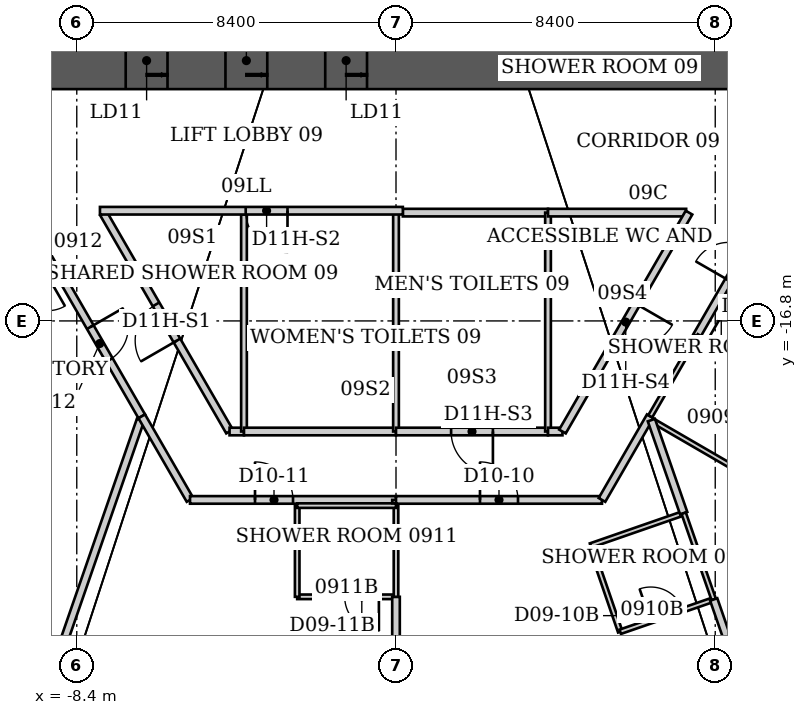
"""IFC4 building model, lengths in metres.
Left out: names, types, materials, properties, quantities, classifications, styles, units other than length and angle.
Written with IfcOpenShell. Run it as: python <this file> out.ifc"""

import sys

from ifc_helpers import new_model, si_unit, direction, frame, frame_2d, origin, place, context, subcontext, project, spatial, rectangle, extrude, element, fill, save


model = new_model("IFC4")
c1 = context("Model", 3, precision=1e-05, world=origin(), true_north=direction((0.0, 1.0)))
c2 = subcontext(c1, "Body", "Model", "MODEL_VIEW")
j1 = project(units=[si_unit("LENGTHUNIT", "METRE"), si_unit("PLANEANGLEUNIT", "RADIAN")], contexts=[c1])
p1 = place(None, origin())
s1 = spatial("IfcSite", under=j1, at=p1, CompositionType="ELEMENT")
p2 = place(p1, origin())
s2 = spatial("IfcBuilding", under=s1, at=p2, CompositionType="ELEMENT")
p3 = place(p2, frame((0.0, 0.0, 42.0)))
s3 = spatial("IfcBuildingStorey", under=s2, at=p3, CompositionType="ELEMENT", Elevation=42.0)
p4 = place(p3, frame((-9.25, -9.95, 0.0), z_axis=(0.0, 0.0, 1.0), x_axis=(1.0, 0.0, 0.0)))
e1 = element("IfcWall", 1, at=p4, inside=s3, PredefinedType="SHEAR", context=c2, shape_type="SweptSolid", body=[
    extrude(rectangle(XDim=18.5, YDim=1.5, at=frame_2d((9.25, 0.0))), origin(), (0.0, 0.0, 1.0), 3.8),
])
p5 = place(p4, frame((2.137, 0.0, 0.0)))
e2 = element("IfcOpeningElement", 2, at=p5, cuts=e1, PredefinedType="OPENING", context=c2, shape_type="SweptSolid", body=[
    extrude(rectangle(XDim=1.1, YDim=2.1, at=frame_2d((0.55, 1.05))), frame((0.0, 0.75, 0.0), z_axis=(0.0, -1.0, 0.0), x_axis=(1.0, 0.0, 0.0)), (0.0, 0.0, 1.0), 1.5),
])
p6 = place(p4, frame((4.762, 0.0, 0.0)))
e3 = element("IfcOpeningElement", 3, at=p6, cuts=e1, PredefinedType="OPENING", context=c2, shape_type="SweptSolid", body=[
    extrude(rectangle(XDim=1.1, YDim=2.1, at=frame_2d((0.55, 1.05))), frame((0.0, 0.75, 0.0), z_axis=(0.0, -1.0, 0.0), x_axis=(1.0, 0.0, 0.0)), (0.0, 0.0, 1.0), 1.5),
])
p7 = place(p4, frame((7.387, 0.0, 0.0)))
e4 = element("IfcOpeningElement", 4, at=p7, cuts=e1, PredefinedType="OPENING", context=c2, shape_type="SweptSolid", body=[
    extrude(rectangle(XDim=1.1, YDim=2.1, at=frame_2d((0.55, 1.05))), frame((0.0, 0.75, 0.0), z_axis=(0.0, -1.0, 0.0), x_axis=(1.0, 0.0, 0.0)), (0.0, 0.0, 1.0), 1.5),
])
p8 = place(p3, frame((-11.17, -16.79, 0.0), z_axis=(0.0, 0.0, 1.0), x_axis=(0.866114241029, 0.499846097802, 0.0)))
e5 = element("IfcWall", 5, at=p8, inside=s3, PredefinedType="PARTITIONING", context=c2, shape_type="SweptSolid", body=[
    extrude(rectangle(XDim=2.621, YDim=0.12, at=frame_2d((1.311, 0.0))), origin(), (0.0, 0.0, 1.0), 3.64),
])
p9 = place(p8, frame((1.421, 0.0, 0.0)))
e6 = element("IfcOpeningElement", 6, at=p9, cuts=e5, PredefinedType="OPENING", context=c2, shape_type="SweptSolid", body=[
    extrude(rectangle(XDim=0.9, YDim=2.03, at=frame_2d((0.45, 1.015))), frame((0.0, 0.06, 0.0), z_axis=(0.0, -1.0, 0.0), x_axis=(1.0, 0.0, 0.0)), (0.0, 0.0, 1.0), 0.12),
])
p10 = place(p3, frame((-10.2, -29.442, 0.0), z_axis=(0.0, 0.0, 1.0), x_axis=(0.327375786306, 0.944894223996, 0.0)))
e7 = element("IfcWall", 7, at=p10, inside=s3, PredefinedType="PARTITIONING", context=c2, shape_type="SweptSolid", body=[
    extrude(rectangle(XDim=10.623, YDim=0.2, at=frame_2d((5.311, 0.0))), origin(), (0.0, 0.0, 1.0), 3.64),
])
p11 = place(p3, frame((-10.1, -13.4, 0.0), z_axis=(0.0, 0.0, 1.0), x_axis=(0.499769390944, -0.866158505053, 0.0)))
e8 = element("IfcWall", 8, at=p11, inside=s3, PredefinedType="PARTITIONING", context=c2, shape_type="SweptSolid", body=[
    extrude(rectangle(XDim=2.402, YDim=0.12, at=frame_2d((1.201, 0.0))), origin(), (0.0, 0.0, 1.0), 3.64),
])
p12 = place(p3, frame((-8.9, -15.48, 0.0), z_axis=(0.0, 0.0, 1.0), x_axis=(0.499773435832, -0.866156171159, 0.0)))
e9 = element("IfcWall", 9, at=p12, inside=s3, PredefinedType="PARTITIONING", context=c2, shape_type="SweptSolid", body=[
    extrude(rectangle(XDim=4.422, YDim=0.2, at=frame_2d((2.211, 0.0))), origin(), (0.0, 0.0, 1.0), 3.64),
])
p13 = place(p12, frame((1.711, 0.0, 0.0)))
e10 = element("IfcOpeningElement", 10, at=p13, cuts=e9, PredefinedType="OPENING", context=c2, shape_type="SweptSolid", body=[
    extrude(rectangle(XDim=1.0, YDim=2.13, at=frame_2d((0.5, 1.065))), frame((0.0, 0.1, 0.0), z_axis=(0.0, -1.0, 0.0), x_axis=(1.0, 0.0, 0.0)), (0.0, 0.0, 1.0), 0.2),
])
p14 = place(p3, frame((-6.69, -19.31, 0.0), z_axis=(0.0, 0.0, 1.0), x_axis=(0.499963722229, -0.866046347752, 0.0)))
e11 = element("IfcWall", 11, at=p14, inside=s3, PredefinedType="PARTITIONING", context=c2, shape_type="SweptSolid", body=[
    extrude(rectangle(XDim=2.54, YDim=0.2, at=frame_2d((1.27, 0.0))), origin(), (0.0, 0.0, 1.0), 3.64),
])
p15 = place(p3, frame((-5.42, -21.51, 0.0), z_axis=(0.0, 0.0, 1.0), x_axis=(1.0, 0.0, 0.0)))
e12 = element("IfcWall", 12, at=p15, inside=s3, PredefinedType="PARTITIONING", context=c2, shape_type="SweptSolid", body=[
    extrude(rectangle(XDim=5.42, YDim=0.2, at=frame_2d((2.71, 0.0))), origin(), (0.0, 0.0, 1.0), 3.64),
])
p16 = place(p15, frame((1.71, 0.0, 0.0)))
e13 = element("IfcOpeningElement", 13, at=p16, cuts=e12, PredefinedType="OPENING", context=c2, shape_type="SweptSolid", body=[
    extrude(rectangle(XDim=1.0, YDim=2.13, at=frame_2d((0.5, 1.065))), frame((0.0, 0.1, 0.0), z_axis=(0.0, -1.0, 0.0), x_axis=(1.0, 0.0, 0.0)), (0.0, 0.0, 1.0), 0.2),
])
p17 = place(p3, frame((-4.38, -19.71, 0.0), z_axis=(0.0, 0.0, 1.0), x_axis=(-0.500523653757, 0.865722860984, 0.0)))
e14 = element("IfcWall", 14, at=p17, inside=s3, PredefinedType="PARTITIONING", context=c2, shape_type="SweptSolid", body=[
    extrude(rectangle(XDim=6.628, YDim=0.2, at=frame_2d((3.314, 0.0))), origin(), (0.0, 0.0, 1.0), 3.64),
])
p18 = place(p17, frame((2.764, 0.0, 0.0)))
e15 = element("IfcOpeningElement", 15, at=p18, cuts=e14, PredefinedType="OPENING", context=c2, shape_type="SweptSolid", body=[
    extrude(rectangle(XDim=1.1, YDim=2.2, at=frame_2d((0.55, 1.1))), frame((0.0, 0.1, 0.0), z_axis=(0.0, -1.0, 0.0), x_axis=(1.0, 0.0, 0.0)), (0.0, 0.0, 1.0), 0.2),
])
p19 = place(p3, frame((-4.0, -19.71, 0.0), z_axis=(0.0, 0.0, 1.0), x_axis=(-1.0, 0.0, 0.0)))
e16 = element("IfcWall", 16, at=p19, inside=s3, PredefinedType="PARTITIONING", context=c2, shape_type="SweptSolid", body=[
    extrude(rectangle(XDim=0.38, YDim=0.2, at=frame_2d((0.19, 0.0))), origin(), (0.0, 0.0, 1.0), 3.64),
])
p20 = place(p3, frame((-4.0, -14.0, 0.0), z_axis=(0.0, 0.0, 1.0), x_axis=(0.0, -1.0, 0.0)))
e17 = element("IfcWall", 17, at=p20, inside=s3, PredefinedType="PARTITIONING", context=c2, shape_type="SweptSolid", body=[
    extrude(rectangle(XDim=5.71, YDim=0.15, at=frame_2d((2.855, 0.0))), origin(), (0.0, 0.0, 1.0), 3.64),
])
p21 = place(p3, frame((-2.6, -24.06, 0.0), z_axis=(0.0, 0.0, 1.0), x_axis=(1.0, 0.0, 0.0)))
e18 = element("IfcWall", 18, at=p21, inside=s3, PredefinedType="PARTITIONING", context=c2, shape_type="SweptSolid", body=[
    extrude(rectangle(XDim=2.6, YDim=0.12, at=frame_2d((1.3, 0.0))), origin(), (0.0, 0.0, 1.0), 3.64),
])
p22 = place(p21, frame((1.25, 0.0, 0.0)))
e19 = element("IfcOpeningElement", 19, at=p22, cuts=e18, PredefinedType="OPENING", context=c2, shape_type="SweptSolid", body=[
    extrude(rectangle(XDim=0.9, YDim=2.03, at=frame_2d((0.45, 1.015))), frame((0.0, 0.06, 0.0), z_axis=(0.0, -1.0, 0.0), x_axis=(1.0, 0.0, 0.0)), (0.0, 0.0, 1.0), 0.12),
])
p23 = place(p3, frame((-2.6, -21.66, 0.0), z_axis=(0.0, 0.0, 1.0), x_axis=(0.0, -1.0, 0.0)))
e20 = element("IfcWall", 20, at=p23, inside=s3, PredefinedType="PARTITIONING", context=c2, shape_type="SweptSolid", body=[
    extrude(rectangle(XDim=2.4, YDim=0.12, at=frame_2d((1.2, 0.0))), origin(), (0.0, 0.0, 1.0), 3.64),
])
p24 = place(p3, frame((0.0, -29.89, 0.0), z_axis=(0.0, 0.0, 1.0), x_axis=(0.0, 1.0, 0.0)))
e21 = element("IfcWall", 21, at=p24, inside=s3, PredefinedType="PARTITIONING", context=c2, shape_type="SweptSolid", body=[
    extrude(rectangle(XDim=5.83, YDim=0.2, at=frame_2d((2.915, 0.0))), origin(), (0.0, 0.0, 1.0), 2.86),
])
p25 = place(p3, frame((0.0, -24.06, 0.0), z_axis=(0.0, 0.0, 1.0), x_axis=(0.0, 1.0, 0.0)))
e22 = element("IfcWall", 22, at=p25, inside=s3, PredefinedType="PARTITIONING", context=c2, shape_type="SweptSolid", body=[
    extrude(rectangle(XDim=2.4, YDim=0.12, at=frame_2d((1.2, 0.0))), origin(), (0.0, 0.0, 1.0), 2.86),
])
p26 = place(p3, frame((0.0, -21.66, 0.0), z_axis=(0.0, 0.0, 1.0), x_axis=(-1.0, 0.0, 0.0)))
e23 = element("IfcWall", 23, at=p26, inside=s3, PredefinedType="PARTITIONING", context=c2, shape_type="SweptSolid", body=[
    extrude(rectangle(XDim=2.6, YDim=0.12, at=frame_2d((1.3, 0.0))), origin(), (0.0, 0.0, 1.0), 3.64),
])
p27 = place(p3, frame((0.0, -21.6, 0.0), z_axis=(0.0, 0.0, 1.0), x_axis=(0.0, 1.0, 0.0)))
e24 = element("IfcWall", 24, at=p27, inside=s3, PredefinedType="PARTITIONING", context=c2, shape_type="SweptSolid", body=[
    extrude(rectangle(XDim=0.09, YDim=0.2, at=frame_2d((0.045, 0.0))), origin(), (0.0, 0.0, 1.0), 3.64),
])
p28 = place(p3, frame((0.0, -21.51, 0.0), z_axis=(0.0, 0.0, 1.0), x_axis=(1.0, 0.0, 0.0)))
e25 = element("IfcWall", 25, at=p28, inside=s3, PredefinedType="PARTITIONING", context=c2, shape_type="SweptSolid", body=[
    extrude(rectangle(XDim=5.42, YDim=0.2, at=frame_2d((2.71, 0.0))), origin(), (0.0, 0.0, 1.0), 3.64),
])
p29 = place(p28, frame((2.21, 0.0, 0.0)))
e26 = element("IfcOpeningElement", 26, at=p29, cuts=e25, PredefinedType="OPENING", context=c2, shape_type="SweptSolid", body=[
    extrude(rectangle(XDim=1.0, YDim=2.13, at=frame_2d((0.5, 1.065))), frame((0.0, 0.1, 0.0), z_axis=(0.0, -1.0, 0.0), x_axis=(1.0, 0.0, 0.0)), (0.0, 0.0, 1.0), 0.2),
])
p30 = place(p3, frame((0.0, -19.71, 0.0), z_axis=(0.0, 0.0, 1.0), x_axis=(-1.0, 0.0, 0.0)))
e27 = element("IfcWall", 27, at=p30, inside=s3, PredefinedType="PARTITIONING", context=c2, shape_type="SweptSolid", body=[
    extrude(rectangle(XDim=4.0, YDim=0.2, at=frame_2d((2.0, 0.0))), origin(), (0.0, 0.0, 1.0), 3.64),
])
p31 = place(p3, frame((0.0, -13.95, 0.0), z_axis=(0.0, 0.0, 1.0), x_axis=(0.0, -1.0, 0.0)))
e28 = element("IfcWall", 28, at=p31, inside=s3, PredefinedType="PARTITIONING", context=c2, shape_type="SweptSolid", body=[
    extrude(rectangle(XDim=5.76, YDim=0.15, at=frame_2d((2.88, 0.0))), origin(), (0.0, 0.0, 1.0), 2.86),
])
p32 = place(p3, frame((0.18, -13.95, 0.0), z_axis=(0.0, 0.0, 1.0), x_axis=(1.0, 0.0, 0.0)))
e29 = element("IfcWall", 29, at=p32, inside=s3, PredefinedType="PARTITIONING", context=c2, shape_type="SweptSolid", body=[
    extrude(rectangle(XDim=3.82, YDim=0.2, at=frame_2d((1.91, 0.0))), origin(), (0.0, 0.0, 1.0), 3.64),
])
p33 = place(p3, frame((0.18, -13.9, 0.0), z_axis=(0.0, 0.0, 1.0), x_axis=(-1.0, 0.0, 0.0)))
e30 = element("IfcWall", 30, at=p33, inside=s3, PredefinedType="PARTITIONING", context=c2, shape_type="SweptSolid", body=[
    extrude(rectangle(XDim=7.97, YDim=0.2, at=frame_2d((3.985, 0.0))), origin(), (0.0, 0.0, 1.0), 3.64),
])
p34 = place(p33, frame((3.035, 0.0, 0.0)))
e31 = element("IfcOpeningElement", 31, at=p34, cuts=e30, PredefinedType="OPENING", context=c2, shape_type="SweptSolid", body=[
    extrude(rectangle(XDim=1.1, YDim=2.2, at=frame_2d((0.55, 1.1))), frame((0.0, 0.1, 0.0), z_axis=(0.0, -1.0, 0.0), x_axis=(1.0, 0.0, 0.0)), (0.0, 0.0, 1.0), 0.2),
])
p35 = place(p3, frame((4.0, -19.71, 0.0), z_axis=(0.0, 0.0, 1.0), x_axis=(-1.0, 0.0, 0.0)))
e32 = element("IfcWall", 32, at=p35, inside=s3, PredefinedType="PARTITIONING", context=c2, shape_type="SweptSolid", body=[
    extrude(rectangle(XDim=4.0, YDim=0.2, at=frame_2d((2.0, 0.0))), origin(), (0.0, 0.0, 1.0), 3.64),
])
p36 = place(p35, frame((1.45, 0.0, 0.0)))
e33 = element("IfcOpeningElement", 33, at=p36, cuts=e32, PredefinedType="OPENING", context=c2, shape_type="SweptSolid", body=[
    extrude(rectangle(XDim=1.1, YDim=2.2, at=frame_2d((0.55, 1.1))), frame((0.0, 0.1, 0.0), z_axis=(0.0, -1.0, 0.0), x_axis=(1.0, 0.0, 0.0)), (0.0, 0.0, 1.0), 0.2),
])
p37 = place(p3, frame((4.0, -13.95, 0.0), z_axis=(0.0, 0.0, 1.0), x_axis=(0.0, -1.0, 0.0)))
e34 = element("IfcWall", 34, at=p37, inside=s3, PredefinedType="PARTITIONING", context=c2, shape_type="SweptSolid", body=[
    extrude(rectangle(XDim=5.76, YDim=0.15, at=frame_2d((2.88, 0.0))), origin(), (0.0, 0.0, 1.0), 3.64),
])
p38 = place(p3, frame((4.0, -13.95, 0.0), z_axis=(0.0, 0.0, 1.0), x_axis=(1.0, 0.0, 0.0)))
e35 = element("IfcWall", 35, at=p38, inside=s3, PredefinedType="PARTITIONING", context=c2, shape_type="SweptSolid", body=[
    extrude(rectangle(XDim=3.635, YDim=0.2, at=frame_2d((1.817, 0.0))), origin(), (0.0, 0.0, 1.0), 3.64),
])
p39 = place(p3, frame((4.38, -19.71, 0.0), z_axis=(0.0, 0.0, 1.0), x_axis=(-1.0, 0.0, 0.0)))
e36 = element("IfcWall", 36, at=p39, inside=s3, PredefinedType="PARTITIONING", context=c2, shape_type="SweptSolid", body=[
    extrude(rectangle(XDim=0.38, YDim=0.2, at=frame_2d((0.19, 0.0))), origin(), (0.0, 0.0, 1.0), 3.64),
])
p40 = place(p3, frame((5.12, -22.71, 0.0), z_axis=(0.0, 0.0, 1.0), x_axis=(0.324880771143, -0.945754981241, 0.0)))
e37 = element("IfcWall", 37, at=p40, inside=s3, PredefinedType="PARTITIONING", context=c2, shape_type="SweptSolid", body=[
    extrude(rectangle(XDim=2.4, YDim=0.12, at=frame_2d((1.2, 0.0))), origin(), (0.0, 0.0, 1.0), 3.64),
])
p41 = place(p3, frame((5.42, -21.51, 0.0), z_axis=(0.0, 0.0, 1.0), x_axis=(0.499963722229, 0.866046347752, 0.0)))
e38 = element("IfcWall", 38, at=p41, inside=s3, PredefinedType="PARTITIONING", context=c2, shape_type="SweptSolid", body=[
    extrude(rectangle(XDim=2.54, YDim=0.2, at=frame_2d((1.27, 0.0))), origin(), (0.0, 0.0, 1.0), 3.64),
])
p42 = place(p3, frame((5.9, -24.98, 0.0), z_axis=(0.0, 0.0, 1.0), x_axis=(0.945165466094, 0.326591857987, 0.0)))
e39 = element("IfcWall", 39, at=p42, inside=s3, PredefinedType="PARTITIONING", context=c2, shape_type="SweptSolid", body=[
    extrude(rectangle(XDim=2.603, YDim=0.12, at=frame_2d((1.302, 0.0))), origin(), (0.0, 0.0, 1.0), 3.64),
])
p43 = place(p42, frame((0.85, 0.0, 0.0)))
e40 = element("IfcOpeningElement", 40, at=p43, cuts=e39, PredefinedType="OPENING", context=c2, shape_type="SweptSolid", body=[
    extrude(rectangle(XDim=0.9, YDim=2.03, at=frame_2d((0.45, 1.015))), frame((0.0, 0.06, 0.0), z_axis=(0.0, -1.0, 0.0), x_axis=(1.0, 0.0, 0.0)), (0.0, 0.0, 1.0), 0.12),
])
p44 = place(p3, frame((6.69, -19.31, 0.0), z_axis=(0.0, 0.0, 1.0), x_axis=(0.500522890398, 0.865723302324, 0.0)))
e41 = element("IfcWall", 41, at=p44, inside=s3, PredefinedType="PARTITIONING", context=c2, shape_type="SweptSolid", body=[
    extrude(rectangle(XDim=2.438, YDim=0.12, at=frame_2d((1.219, 0.0))), origin(), (0.0, 0.0, 1.0), 3.64),
])
p45 = place(p3, frame((6.808, -19.455, 0.0), z_axis=(0.0, 0.0, 1.0), x_axis=(0.864881956308, -0.501975299844, 0.0)))
e42 = element("IfcWall", 42, at=p45, inside=s3, PredefinedType="PARTITIONING", context=c2, shape_type="SweptSolid", body=[
    extrude(rectangle(XDim=2.5, YDim=0.12, at=frame_2d((1.25, 0.0))), origin(), (0.0, 0.0, 1.0), 3.64),
])
p46 = place(p3, frame((7.57, -21.86, 0.0), z_axis=(0.0, 0.0, 1.0), x_axis=(-0.944782191137, -0.327698964463, 0.0)))
e43 = element("IfcWall", 43, at=p46, inside=s3, PredefinedType="PARTITIONING", context=c2, shape_type="SweptSolid", body=[
    extrude(rectangle(XDim=2.594, YDim=0.12, at=frame_2d((1.297, 0.0))), origin(), (0.0, 0.0, 1.0), 3.64),
])
p47 = place(p3, frame((7.57, -21.86, 0.0), z_axis=(0.0, 0.0, 1.0), x_axis=(-0.327782990589, 0.944753042377, 0.0)))
e44 = element("IfcWall", 44, at=p47, inside=s3, PredefinedType="PARTITIONING", context=c2, shape_type="SweptSolid", body=[
    extrude(rectangle(XDim=2.594, YDim=0.2, at=frame_2d((1.297, 0.0))), origin(), (0.0, 0.0, 1.0), 3.64),
])
p48 = place(p3, frame((7.57, -21.86, 0.0), z_axis=(0.0, 0.0, 1.0), x_axis=(0.328725498061, -0.944425511581, 0.0)))
e45 = element("IfcWall", 45, at=p48, inside=s3, PredefinedType="PARTITIONING", context=c2, shape_type="SweptSolid", body=[
    extrude(rectangle(XDim=2.403, YDim=0.12, at=frame_2d((1.202, 0.0))), origin(), (0.0, 0.0, 1.0), 3.64),
])
p49 = place(p3, frame((7.71, -13.95, 0.0), z_axis=(0.0, 0.0, 1.0), x_axis=(-0.500511113963, -0.865730110831, 0.0)))
e46 = element("IfcWall", 46, at=p49, inside=s3, PredefinedType="PARTITIONING", context=c2, shape_type="SweptSolid", body=[
    extrude(rectangle(XDim=6.653, YDim=0.2, at=frame_2d((3.327, 0.0))), origin(), (0.0, 0.0, 1.0), 3.64),
])
p50 = place(p49, frame((2.777, 0.0, 0.0)))
e47 = element("IfcOpeningElement", 47, at=p50, cuts=e46, PredefinedType="OPENING", context=c2, shape_type="SweptSolid", body=[
    extrude(rectangle(XDim=1.1, YDim=2.2, at=frame_2d((0.55, 1.1))), frame((0.0, 0.1, 0.0), z_axis=(0.0, -1.0, 0.0), x_axis=(1.0, 0.0, 0.0)), (0.0, 0.0, 1.0), 0.2),
])
p51 = place(p3, frame((7.909, -17.199, 0.0), z_axis=(0.0, 0.0, 1.0), x_axis=(0.499528080516, 0.866297695239, 0.0)))
e48 = element("IfcWall", 48, at=p51, inside=s3, PredefinedType="PARTITIONING", context=c2, shape_type="SweptSolid", body=[
    extrude(rectangle(XDim=4.386, YDim=0.2, at=frame_2d((2.193, 0.0))), origin(), (0.0, 0.0, 1.0), 3.64),
])
p52 = place(p51, frame((1.693, 0.0, 0.0)))
e49 = element("IfcOpeningElement", 49, at=p52, cuts=e48, PredefinedType="OPENING", context=c2, shape_type="SweptSolid", body=[
    extrude(rectangle(XDim=1.0, YDim=2.13, at=frame_2d((0.5, 1.065))), frame((0.0, 0.1, 0.0), z_axis=(0.0, -1.0, 0.0), x_axis=(1.0, 0.0, 0.0)), (0.0, 0.0, 1.0), 0.2),
])
p53 = place(p3, frame((8.36, -24.13, 0.0), z_axis=(0.0, 0.0, 1.0), x_axis=(0.327332811485, -0.944909112309, 0.0)))
e50 = element("IfcWall", 50, at=p53, inside=s3, PredefinedType="PARTITIONING", context=c2, shape_type="SweptSolid", body=[
    extrude(rectangle(XDim=5.621, YDim=0.2, at=frame_2d((2.811, 0.0))), origin(), (0.0, 0.0, 1.0), 3.64),
])
p54 = place(p3, frame((10.22, -18.54, 0.0), z_axis=(0.0, 0.0, 1.0), x_axis=(-0.86498992408, 0.501789229896, 0.0)))
e51 = element("IfcWall", 51, at=p54, inside=s3, PredefinedType="PARTITIONING", context=c2, shape_type="SweptSolid", body=[
    extrude(rectangle(XDim=2.671, YDim=0.12, at=frame_2d((1.335, 0.0))), origin(), (0.0, 0.0, 1.0), 3.64),
])
p55 = place(p54, frame((1.47, 0.0, 0.0)))
e52 = element("IfcOpeningElement", 52, at=p55, cuts=e51, PredefinedType="OPENING", context=c2, shape_type="SweptSolid", body=[
    extrude(rectangle(XDim=0.9, YDim=2.03, at=frame_2d((0.45, 1.015))), frame((0.0, 0.06, 0.0), z_axis=(0.0, -1.0, 0.0), x_axis=(1.0, 0.0, 0.0)), (0.0, 0.0, 1.0), 0.12),
])
p56 = place(p55, origin())
e53 = element("IfcDoor", 53, at=p56, inside=s3, OperationType="SINGLE_SWING_RIGHT", PredefinedType="DOOR", context=c2, shape_type="SweptSolid", body=[
    extrude(rectangle(XDim=0.9, YDim=2.03, at=frame_2d((0.45, 1.015))), frame((0.0, 0.025, 0.0), z_axis=(0.0, -1.0, 0.0), x_axis=(1.0, 0.0, 0.0)), (0.0, 0.0, 1.0), 0.05),
])
fill(e52, e53)
p57 = place(p29, origin())
e54 = element("IfcDoor", 54, at=p57, inside=s3, OperationType="SINGLE_SWING_LEFT", PredefinedType="DOOR", context=c2, shape_type="SweptSolid", body=[
    extrude(rectangle(XDim=1.0, YDim=2.13, at=frame_2d((0.5, 1.065))), frame((0.0, 0.025, 0.0), z_axis=(0.0, -1.0, 0.0), x_axis=(1.0, 0.0, 0.0)), (0.0, 0.0, 1.0), 0.05),
])
fill(e26, e54)
p58 = place(p43, origin())
e55 = element("IfcDoor", 55, at=p58, inside=s3, OperationType="SINGLE_SWING_LEFT", PredefinedType="DOOR", context=c2, shape_type="SweptSolid", body=[
    extrude(rectangle(XDim=0.9, YDim=2.03, at=frame_2d((0.45, 1.015))), frame((0.0, 0.025, 0.0), z_axis=(0.0, -1.0, 0.0), x_axis=(1.0, 0.0, 0.0)), (0.0, 0.0, 1.0), 0.05),
])
fill(e40, e55)
p59 = place(p16, origin())
e56 = element("IfcDoor", 56, at=p59, inside=s3, OperationType="SINGLE_SWING_LEFT", PredefinedType="DOOR", context=c2, shape_type="SweptSolid", body=[
    extrude(rectangle(XDim=1.0, YDim=2.13, at=frame_2d((0.5, 1.065))), frame((0.0, 0.025, 0.0), z_axis=(0.0, -1.0, 0.0), x_axis=(1.0, 0.0, 0.0)), (0.0, 0.0, 1.0), 0.05),
])
fill(e13, e56)
p60 = place(p22, origin())
e57 = element("IfcDoor", 57, at=p60, inside=s3, OperationType="SINGLE_SWING_RIGHT", PredefinedType="DOOR", context=c2, shape_type="SweptSolid", body=[
    extrude(rectangle(XDim=0.9, YDim=2.03, at=frame_2d((0.45, 1.015))), frame((0.0, 0.025, 0.0), z_axis=(0.0, -1.0, 0.0), x_axis=(1.0, 0.0, 0.0)), (0.0, 0.0, 1.0), 0.05),
])
fill(e19, e57)
p61 = place(p13, origin())
e58 = element("IfcDoor", 58, at=p61, inside=s3, OperationType="SINGLE_SWING_LEFT", PredefinedType="DOOR", context=c2, shape_type="SweptSolid", body=[
    extrude(rectangle(XDim=1.0, YDim=2.13, at=frame_2d((0.5, 1.065))), frame((0.0, 0.025, 0.0), z_axis=(0.0, -1.0, 0.0), x_axis=(1.0, 0.0, 0.0)), (0.0, 0.0, 1.0), 0.05),
])
fill(e10, e58)
p62 = place(p18, origin())
e59 = element("IfcDoor", 59, at=p62, inside=s3, OperationType="SINGLE_SWING_LEFT", PredefinedType="DOOR", context=c2, shape_type="SweptSolid", body=[
    extrude(rectangle(XDim=1.1, YDim=2.2, at=frame_2d((0.55, 1.1))), frame((0.0, 0.025, 0.0), z_axis=(0.0, -1.0, 0.0), x_axis=(1.0, 0.0, 0.0)), (0.0, 0.0, 1.0), 0.05),
])
fill(e15, e59)
p63 = place(p34, origin())
e60 = element("IfcDoor", 60, at=p63, inside=s3, OperationType="SINGLE_SWING_LEFT", PredefinedType="DOOR", context=c2, shape_type="SweptSolid", body=[
    extrude(rectangle(XDim=1.1, YDim=2.2, at=frame_2d((0.55, 1.1))), frame((0.0, 0.025, 0.0), z_axis=(0.0, -1.0, 0.0), x_axis=(1.0, 0.0, 0.0)), (0.0, 0.0, 1.0), 0.05),
])
fill(e31, e60)
p64 = place(p36, origin())
e61 = element("IfcDoor", 61, at=p64, inside=s3, OperationType="SINGLE_SWING_LEFT", PredefinedType="DOOR", context=c2, shape_type="SweptSolid", body=[
    extrude(rectangle(XDim=1.1, YDim=2.2, at=frame_2d((0.55, 1.1))), frame((0.0, 0.025, 0.0), z_axis=(0.0, -1.0, 0.0), x_axis=(1.0, 0.0, 0.0)), (0.0, 0.0, 1.0), 0.05),
])
fill(e33, e61)
p65 = place(p50, origin())
e62 = element("IfcDoor", 62, at=p65, inside=s3, OperationType="SINGLE_SWING_LEFT", PredefinedType="DOOR", context=c2, shape_type="SweptSolid", body=[
    extrude(rectangle(XDim=1.1, YDim=2.2, at=frame_2d((0.55, 1.1))), frame((0.0, 0.025, 0.0), z_axis=(0.0, -1.0, 0.0), x_axis=(1.0, 0.0, 0.0)), (0.0, 0.0, 1.0), 0.05),
])
fill(e47, e62)
p66 = place(p5, origin())
e63 = element("IfcDoor", 63, at=p66, inside=s3, OperationType="DOUBLE_DOOR_SLIDING", PredefinedType="DOOR", context=c2, shape_type="SweptSolid", body=[
    extrude(rectangle(XDim=1.1, YDim=2.1, at=frame_2d((0.55, 1.05))), frame((0.0, 0.025, 0.0), z_axis=(0.0, -1.0, 0.0), x_axis=(1.0, 0.0, 0.0)), (0.0, 0.0, 1.0), 0.05),
])
fill(e2, e63)
p67 = place(p6, origin())
e64 = element("IfcDoor", 64, at=p67, inside=s3, OperationType="DOUBLE_DOOR_SLIDING", PredefinedType="DOOR", context=c2, shape_type="SweptSolid", body=[
    extrude(rectangle(XDim=1.1, YDim=2.1, at=frame_2d((0.55, 1.05))), frame((0.0, 0.025, 0.0), z_axis=(0.0, -1.0, 0.0), x_axis=(1.0, 0.0, 0.0)), (0.0, 0.0, 1.0), 0.05),
])
fill(e3, e64)
p68 = place(p7, origin())
e65 = element("IfcDoor", 65, at=p68, inside=s3, OperationType="DOUBLE_DOOR_SLIDING", PredefinedType="DOOR", context=c2, shape_type="SweptSolid", body=[
    extrude(rectangle(XDim=1.1, YDim=2.1, at=frame_2d((0.55, 1.05))), frame((0.0, 0.025, 0.0), z_axis=(0.0, -1.0, 0.0), x_axis=(1.0, 0.0, 0.0)), (0.0, 0.0, 1.0), 0.05),
])
fill(e4, e65)
save(model, sys.argv[1])
